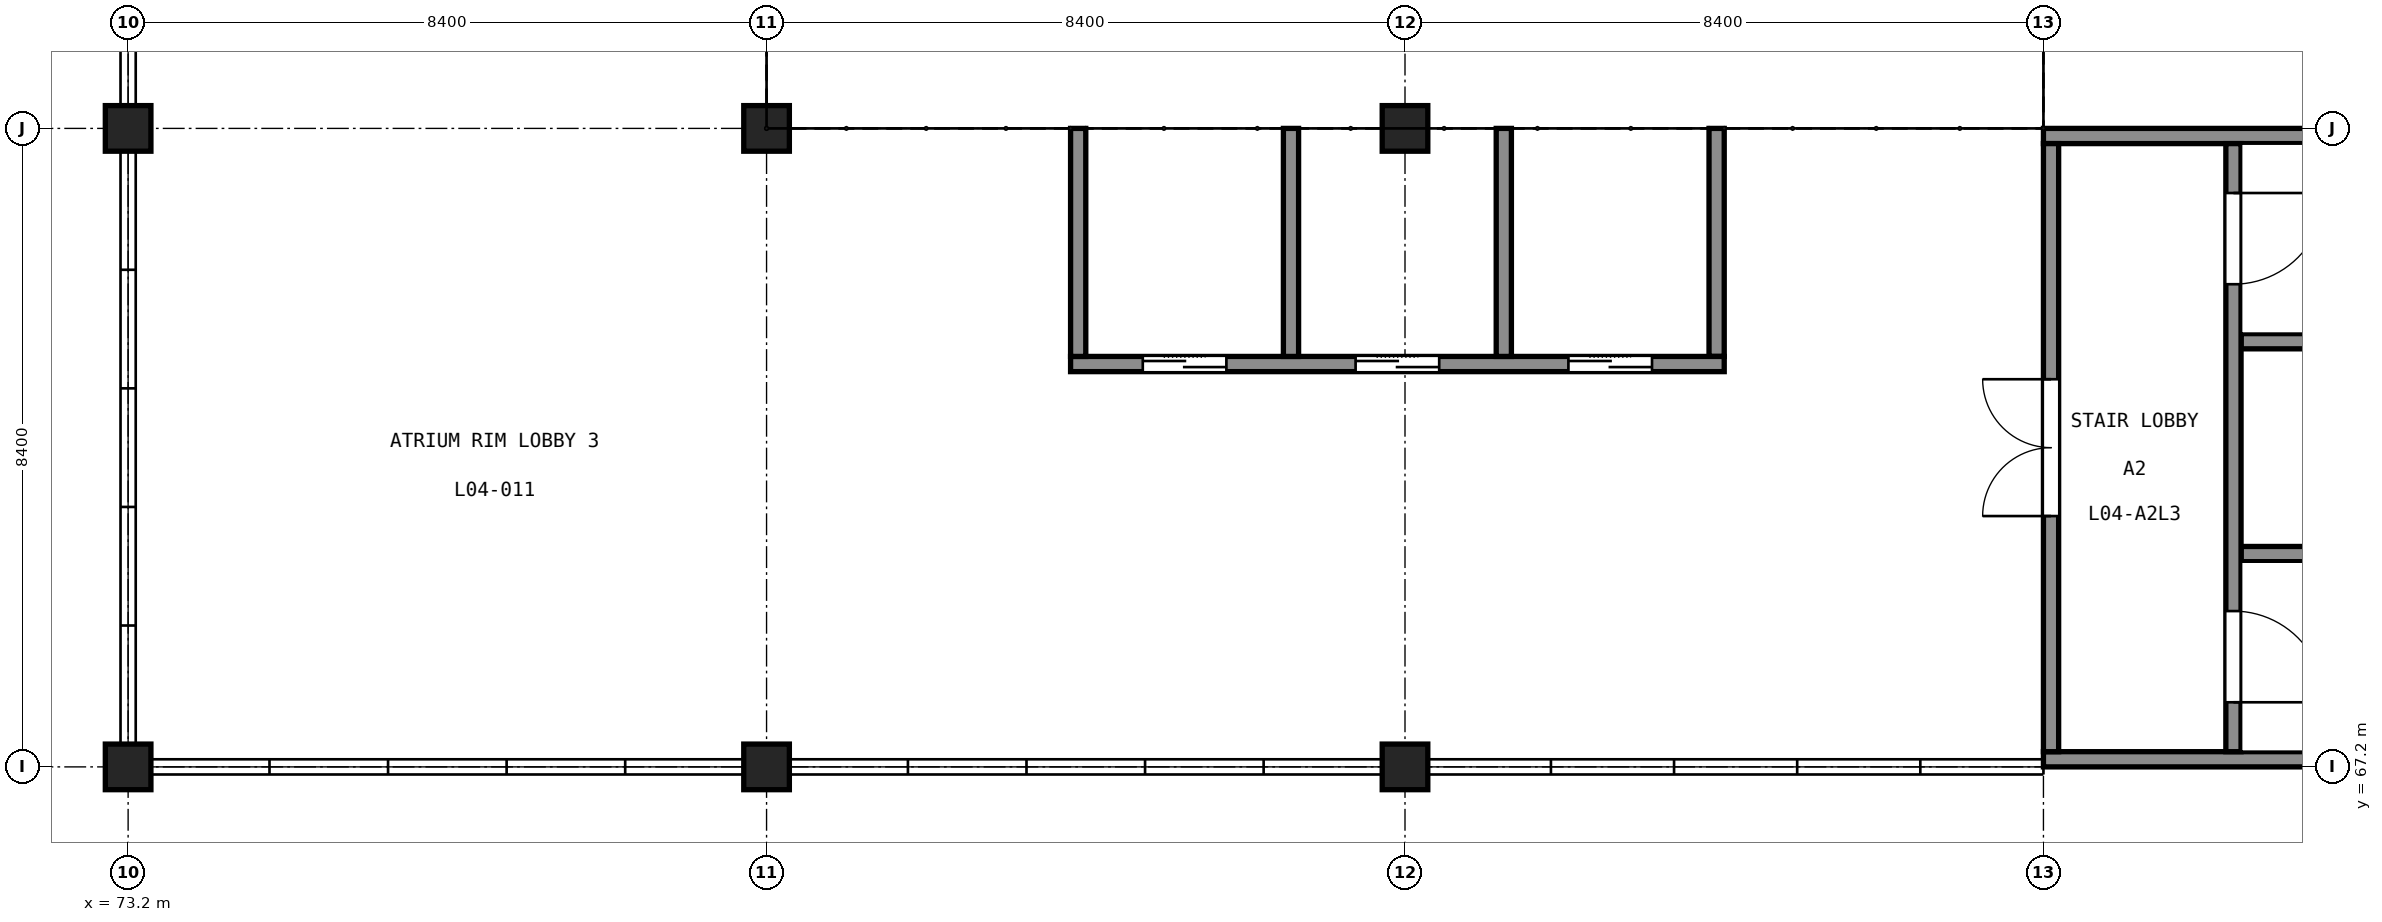
"""IFC4 building model, lengths in metres.
Left out: names, types, materials, properties, quantities, classifications, styles, units other than length and angle.
Written with IfcOpenShell. Run it as: python <this file> out.ifc"""

import sys

from ifc_helpers import new_model, si_unit, direction, frame, frame_2d, origin, origin_2d, place, context, subcontext, project, spatial, rectangle, extrude, element, fill, save


model = new_model("IFC4")
c1 = context("Model", 3, precision=1e-05, world=origin(), true_north=direction((0.0, 1.0)))
c2 = subcontext(c1, "Body", "Model", "MODEL_VIEW")
j1 = project(units=[si_unit("LENGTHUNIT", "METRE"), si_unit("PLANEANGLEUNIT", "RADIAN")], contexts=[c1])
p1 = place(None, origin())
s1 = spatial("IfcSite", under=j1, at=p1, CompositionType="ELEMENT")
p2 = place(p1, origin())
s2 = spatial("IfcBuilding", under=s1, at=p2, CompositionType="ELEMENT")
p3 = place(p2, frame((0.0, 0.0, 25.0)))
s3 = spatial("IfcBuildingStorey", under=s2, at=p3, CompositionType="ELEMENT", Elevation=25.0)
for number, where, z_axis, x_axis in (
    (1, (98.4, 67.3, 0.0), (0.0, 0.0, 1.0), (1.0, 0.0, 0.0)),
    (2, (98.4, 75.5, 0.0), (0.0, 0.0, 1.0), (1.0, 0.0, 0.0)),
):
    element("IfcWall", number, at=place(p3, frame(where, z_axis=z_axis, x_axis=x_axis)), inside=s3, PredefinedType="SHEAR", context=c2, shape_type="SweptSolid", body=[
        extrude(rectangle(XDim=8.4, YDim=0.2, at=frame_2d((4.2, 0.0))), origin(), (0.0, 0.0, 1.0), 5.0),
    ])
p4 = place(p3, frame((98.5, 67.4, 0.0), z_axis=(0.0, 0.0, 1.0), x_axis=(0.0, 1.0, 0.0)))
e3 = element("IfcWall", 3, at=p4, inside=s3, PredefinedType="SHEAR", context=c2, shape_type="SweptSolid", body=[
    extrude(rectangle(XDim=8.0, YDim=0.2, at=frame_2d((4.0, 0.0))), origin(), (0.0, 0.0, 1.0), 5.0),
])
p5 = place(p4, frame((3.1, 0.0, 0.0)))
e4 = element("IfcOpeningElement", 4, at=p5, cuts=e3, PredefinedType="OPENING", context=c2, shape_type="SweptSolid", body=[
    extrude(rectangle(XDim=1.8, YDim=2.1, at=frame_2d((0.9, 1.05))), frame((0.0, 0.11, 0.0), z_axis=(0.0, -1.0, 0.0), x_axis=(1.0, 0.0, 0.0)), (0.0, 0.0, 1.0), 0.22),
])
p6 = place(p3, frame((100.9, 67.4, 0.0), z_axis=(0.0, 0.0, 1.0), x_axis=(0.0, 1.0, 0.0)))
e5 = element("IfcWall", 5, at=p6, inside=s3, PredefinedType="SHEAR", context=c2, shape_type="SweptSolid", body=[
    extrude(rectangle(XDim=8.0, YDim=0.2, at=frame_2d((4.0, 0.0))), origin(), (0.0, 0.0, 1.0), 5.0),
])
p7 = place(p6, frame((0.65, 0.0, 0.0)))
e6 = element("IfcOpeningElement", 6, at=p7, cuts=e5, PredefinedType="OPENING", context=c2, shape_type="SweptSolid", body=[
    extrude(rectangle(XDim=1.2, YDim=2.1, at=frame_2d((0.6, 1.05))), frame((0.0, 0.11, 0.0), z_axis=(0.0, -1.0, 0.0), x_axis=(1.0, 0.0, 0.0)), (0.0, 0.0, 1.0), 0.22),
])
p8 = place(p6, frame((6.15, 0.0, 0.0)))
e7 = element("IfcOpeningElement", 7, at=p8, cuts=e5, PredefinedType="OPENING", context=c2, shape_type="SweptSolid", body=[
    extrude(rectangle(XDim=1.2, YDim=2.1, at=frame_2d((0.6, 1.05))), frame((0.0, 0.11, 0.0), z_axis=(0.0, -1.0, 0.0), x_axis=(1.0, 0.0, 0.0)), (0.0, 0.0, 1.0), 0.22),
])
for number, where, z_axis, x_axis in (
    (8, (101.0, 70.0, 0.0), (0.0, 0.0, 1.0), (1.0, 0.0, 0.0)),
    (9, (101.0, 72.8, 0.0), (0.0, 0.0, 1.0), (1.0, 0.0, 0.0)),
):
    element("IfcWall", number, at=place(p3, frame(where, z_axis=z_axis, x_axis=x_axis)), inside=s3, PredefinedType="SHEAR", context=c2, shape_type="SweptSolid", body=[
        extrude(rectangle(XDim=5.6, YDim=0.2, at=frame_2d((2.8, 0.0))), origin(), (0.0, 0.0, 1.0), 5.0),
    ])
p9 = place(p3, frame((85.6, 72.5, 0.0), z_axis=(0.0, 0.0, 1.0), x_axis=(1.0, 0.0, 0.0)))
e10 = element("IfcWall", 10, at=p9, inside=s3, PredefinedType="SHEAR", context=c2, shape_type="SweptSolid", body=[
    extrude(rectangle(XDim=8.6, YDim=0.2, at=frame_2d((4.3, 0.0))), origin(), (0.0, 0.0, 1.0), 5.0),
])
p10 = place(p9, frame((0.95, 0.0, 0.0)))
e11 = element("IfcOpeningElement", 11, at=p10, cuts=e10, PredefinedType="OPENING", context=c2, shape_type="SweptSolid", body=[
    extrude(rectangle(XDim=1.1, YDim=2.1, at=frame_2d((0.55, 1.05))), frame((0.0, 0.11, 0.0), z_axis=(0.0, -1.0, 0.0), x_axis=(1.0, 0.0, 0.0)), (0.0, 0.0, 1.0), 0.22),
])
p11 = place(p9, frame((3.75, 0.0, 0.0)))
e12 = element("IfcOpeningElement", 12, at=p11, cuts=e10, PredefinedType="OPENING", context=c2, shape_type="SweptSolid", body=[
    extrude(rectangle(XDim=1.1, YDim=2.1, at=frame_2d((0.55, 1.05))), frame((0.0, 0.11, 0.0), z_axis=(0.0, -1.0, 0.0), x_axis=(1.0, 0.0, 0.0)), (0.0, 0.0, 1.0), 0.22),
])
p12 = place(p9, frame((6.55, 0.0, 0.0)))
e13 = element("IfcOpeningElement", 13, at=p12, cuts=e10, PredefinedType="OPENING", context=c2, shape_type="SweptSolid", body=[
    extrude(rectangle(XDim=1.1, YDim=2.1, at=frame_2d((0.55, 1.05))), frame((0.0, 0.11, 0.0), z_axis=(0.0, -1.0, 0.0), x_axis=(1.0, 0.0, 0.0)), (0.0, 0.0, 1.0), 0.22),
])
for number, where, z_axis, x_axis in (
    (14, (85.7, 72.6, 0.0), (0.0, 0.0, 1.0), (0.0, 1.0, 0.0)),
    (15, (94.1, 72.6, 0.0), (0.0, 0.0, 1.0), (0.0, 1.0, 0.0)),
    (16, (88.5, 72.6, 0.0), (0.0, 0.0, 1.0), (0.0, 1.0, 0.0)),
    (17, (91.3, 72.6, 0.0), (0.0, 0.0, 1.0), (0.0, 1.0, 0.0)),
):
    element("IfcWall", number, at=place(p3, frame(where, z_axis=z_axis, x_axis=x_axis)), inside=s3, PredefinedType="SHEAR", context=c2, shape_type="SweptSolid", body=[
        extrude(rectangle(XDim=3.0, YDim=0.2, at=frame_2d((1.5, 0.0))), origin(), (0.0, 0.0, 1.0), 5.0),
    ])
for number, where, z_axis, x_axis in (
    (18, (73.2, 67.2, 0.0), (0.0, 0.0, 1.0), (1.0, 0.0, 0.0)),
    (19, (73.2, 75.6, 0.0), (0.0, 0.0, 1.0), (1.0, 0.0, 0.0)),
    (20, (81.6, 67.2, 0.0), (0.0, 0.0, 1.0), (1.0, 0.0, 0.0)),
    (21, (81.6, 75.6, 0.0), (0.0, 0.0, 1.0), (1.0, 0.0, 0.0)),
    (22, (90.0, 67.2, 0.0), (0.0, 0.0, 1.0), (1.0, 0.0, 0.0)),
    (23, (90.0, 75.6, 0.0), (0.0, 0.0, 1.0), (1.0, 0.0, 0.0)),
):
    element("IfcColumn", number, at=place(p3, frame(where, z_axis=z_axis, x_axis=x_axis)), inside=s3, PredefinedType="COLUMN", context=c2, shape_type="SweptSolid", body=[
        extrude(rectangle(XDim=0.6, YDim=0.6, at=origin_2d()), origin(), (0.0, 0.0, 1.0), 5.0),
    ])
p13 = place(p5, origin())
e24 = element("IfcDoor", 24, at=p13, inside=s3, OperationType="DOUBLE_DOOR_SINGLE_SWING", PredefinedType="DOOR", context=c2, shape_type="SweptSolid", body=[
    extrude(rectangle(XDim=1.8, YDim=2.1, at=frame_2d((0.9, 1.05))), frame((0.0, 0.025, 0.0), z_axis=(0.0, -1.0, 0.0), x_axis=(1.0, 0.0, 0.0)), (0.0, 0.0, 1.0), 0.05),
])
fill(e4, e24)
p14 = place(p7, origin())
e25 = element("IfcDoor", 25, at=p14, inside=s3, OperationType="SINGLE_SWING_LEFT", PredefinedType="DOOR", context=c2, shape_type="SweptSolid", body=[
    extrude(rectangle(XDim=1.2, YDim=2.1, at=frame_2d((0.6, 1.05))), frame((0.0, 0.025, 0.0), z_axis=(0.0, -1.0, 0.0), x_axis=(1.0, 0.0, 0.0)), (0.0, 0.0, 1.0), 0.05),
])
fill(e6, e25)
p15 = place(p8, origin())
e26 = element("IfcDoor", 26, at=p15, inside=s3, OperationType="SINGLE_SWING_RIGHT", PredefinedType="DOOR", context=c2, shape_type="SweptSolid", body=[
    extrude(rectangle(XDim=1.2, YDim=2.1, at=frame_2d((0.6, 1.05))), frame((0.0, 0.025, 0.0), z_axis=(0.0, -1.0, 0.0), x_axis=(1.0, 0.0, 0.0)), (0.0, 0.0, 1.0), 0.05),
])
fill(e7, e26)
p16 = place(p10, origin())
e27 = element("IfcDoor", 27, at=p16, inside=s3, OperationType="DOUBLE_DOOR_SLIDING", PredefinedType="DOOR", context=c2, shape_type="SweptSolid", body=[
    extrude(rectangle(XDim=1.1, YDim=2.1, at=frame_2d((0.55, 1.05))), frame((0.0, 0.025, 0.0), z_axis=(0.0, -1.0, 0.0), x_axis=(1.0, 0.0, 0.0)), (0.0, 0.0, 1.0), 0.05),
])
fill(e11, e27)
p17 = place(p11, origin())
e28 = element("IfcDoor", 28, at=p17, inside=s3, OperationType="DOUBLE_DOOR_SLIDING", PredefinedType="DOOR", context=c2, shape_type="SweptSolid", body=[
    extrude(rectangle(XDim=1.1, YDim=2.1, at=frame_2d((0.55, 1.05))), frame((0.0, 0.025, 0.0), z_axis=(0.0, -1.0, 0.0), x_axis=(1.0, 0.0, 0.0)), (0.0, 0.0, 1.0), 0.05),
])
fill(e12, e28)
p18 = place(p12, origin())
e29 = element("IfcDoor", 29, at=p18, inside=s3, OperationType="DOUBLE_DOOR_SLIDING", PredefinedType="DOOR", context=c2, shape_type="SweptSolid", body=[
    extrude(rectangle(XDim=1.1, YDim=2.1, at=frame_2d((0.55, 1.05))), frame((0.0, 0.025, 0.0), z_axis=(0.0, -1.0, 0.0), x_axis=(1.0, 0.0, 0.0)), (0.0, 0.0, 1.0), 0.05),
])
fill(e13, e29)
save(model, sys.argv[1])
